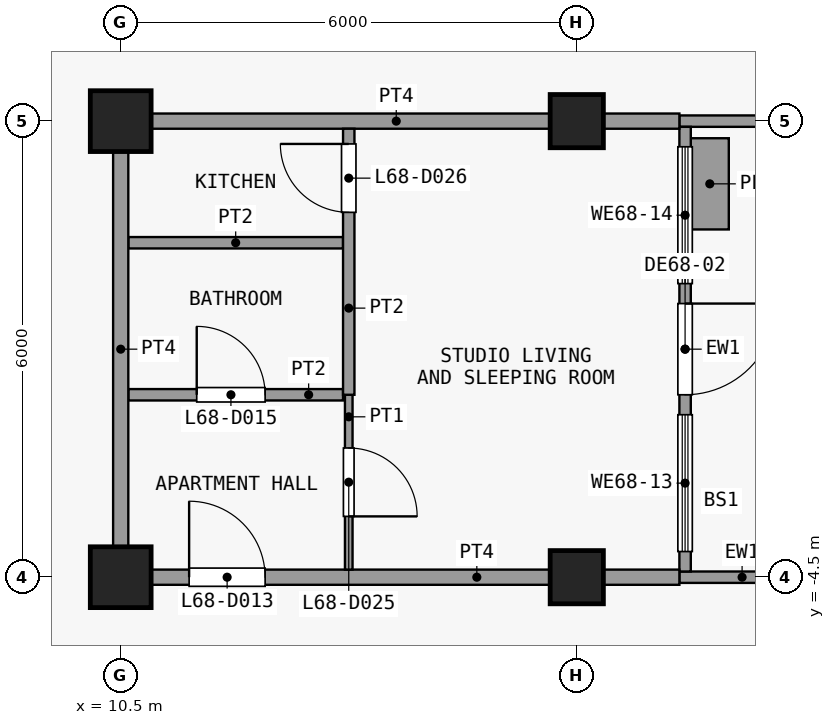
"""IFC4 building model, lengths in metres.
Left out: names, types, materials, properties, quantities, classifications, styles, units other than length and angle.
Written with IfcOpenShell. Run it as: python <this file> out.ifc"""

import sys

from ifc_helpers import new_model, si_unit, direction, frame, frame_2d, origin, origin_2d, place, context, subcontext, project, spatial, rectangle, extrude, element, fill, save


model = new_model("IFC4")
c1 = context("Model", 3, precision=1e-05, world=origin(), true_north=direction((0.0, 1.0)))
c2 = subcontext(c1, "Body", "Model", "MODEL_VIEW")
j1 = project(units=[si_unit("LENGTHUNIT", "METRE"), si_unit("PLANEANGLEUNIT", "RADIAN")], contexts=[c1])
p1 = place(None, origin())
s1 = spatial("IfcSite", under=j1, at=p1, CompositionType="ELEMENT")
p2 = place(p1, origin())
s2 = spatial("IfcBuilding", under=s1, at=p2, CompositionType="ELEMENT")
p3 = place(p2, frame((0.0, 0.0, 269.9)))
s3 = spatial("IfcBuildingStorey", under=s2, at=p3, CompositionType="ELEMENT", Elevation=269.9)
for number, where, z_axis, x_axis in (
    (1, (10.5, -4.5, 0.0), (0.0, 0.0, 1.0), (1.0, 0.0, 0.0)),
    (2, (10.5, 1.5, 0.0), (0.0, 0.0, 1.0), (1.0, 0.0, 0.0)),
):
    element("IfcColumn", number, at=place(p3, frame(where, z_axis=z_axis, x_axis=x_axis)), inside=s3, PredefinedType="COLUMN", context=c2, shape_type="SweptSolid", body=[
        extrude(rectangle(XDim=0.8, YDim=0.8, at=origin_2d()), origin(), (0.0, 0.0, 1.0), 3.6),
    ])
for number, where, z_axis, x_axis in (
    (3, (16.5, -4.5, 0.0), (0.0, 0.0, 1.0), (1.0, 0.0, 0.0)),
    (4, (16.5, 1.5, 0.0), (0.0, 0.0, 1.0), (1.0, 0.0, 0.0)),
):
    element("IfcColumn", number, at=place(p3, frame(where, z_axis=z_axis, x_axis=x_axis)), inside=s3, PredefinedType="COLUMN", context=c2, shape_type="SweptSolid", body=[
        extrude(rectangle(XDim=0.7, YDim=0.7, at=origin_2d()), origin(), (0.0, 0.0, 1.0), 3.6),
    ])
p4 = place(p3, frame((17.85, -4.5, 0.0), z_axis=(0.0, 0.0, 1.0), x_axis=(1.0, 0.0, 0.0)))
e5 = element("IfcWall", 5, at=p4, inside=s3, PredefinedType="SOLIDWALL", context=c2, shape_type="SweptSolid", body=[
    extrude(rectangle(XDim=1.65, YDim=0.15, at=frame_2d((0.825, 0.0))), origin(), (0.0, 0.0, 1.0), 3.3),
])
p5 = place(p3, frame((17.85, 1.5, 0.0), z_axis=(0.0, 0.0, 1.0), x_axis=(1.0, 0.0, 0.0)))
e6 = element("IfcWall", 6, at=p5, inside=s3, PredefinedType="SOLIDWALL", context=c2, shape_type="SweptSolid", body=[
    extrude(rectangle(XDim=2.55, YDim=0.15, at=frame_2d((1.275, 0.0))), origin(), (0.0, 0.0, 1.0), 3.3),
])
p6 = place(p3, frame((17.925, 1.425, 0.0), z_axis=(0.0, 0.0, 1.0), x_axis=(0.0, -1.0, 0.0)))
e7 = element("IfcWall", 7, at=p6, inside=s3, PredefinedType="SOLIDWALL", context=c2, shape_type="SweptSolid", body=[
    extrude(rectangle(XDim=5.85, YDim=0.15, at=frame_2d((2.925, 0.0))), origin(), (0.0, 0.0, 1.0), 3.3),
])
p7 = place(p6, frame((2.325, 0.0, 0.0)))
e8 = element("IfcOpeningElement", 8, at=p7, cuts=e7, PredefinedType="OPENING", context=c2, shape_type="SweptSolid", body=[
    extrude(rectangle(XDim=1.2, YDim=2.4, at=frame_2d((0.6, 1.2))), frame((0.0, 0.085, 0.0), z_axis=(0.0, -1.0, 0.0), x_axis=(1.0, 0.0, 0.0)), (0.0, 0.0, 1.0), 0.17),
])
p8 = place(p6, frame((3.788, 0.0, 0.9)))
e9 = element("IfcOpeningElement", 9, at=p8, cuts=e7, PredefinedType="OPENING", context=c2, shape_type="SweptSolid", body=[
    extrude(rectangle(XDim=1.8, YDim=2.1, at=frame_2d((0.9, 1.05))), frame((0.0, 0.085, 0.0), z_axis=(0.0, -1.0, 0.0), x_axis=(1.0, 0.0, 0.0)), (0.0, 0.0, 1.0), 0.17),
])
p9 = place(p6, frame((0.262, 0.0, 0.9)))
e10 = element("IfcOpeningElement", 10, at=p9, cuts=e7, PredefinedType="OPENING", context=c2, shape_type="SweptSolid", body=[
    extrude(rectangle(XDim=1.8, YDim=2.1, at=frame_2d((0.9, 1.05))), frame((0.0, 0.085, 0.0), z_axis=(0.0, -1.0, 0.0), x_axis=(1.0, 0.0, 0.0)), (0.0, 0.0, 1.0), 0.17),
])
p10 = place(p3, frame((18.25, 0.075, 0.0), z_axis=(0.0, 0.0, 1.0), x_axis=(0.0, 1.0, 0.0)))
e11 = element("IfcWall", 11, at=p10, inside=s3, PredefinedType="USERDEFINED", context=c2, shape_type="SweptSolid", body=[
    extrude(rectangle(XDim=1.2, YDim=0.5, at=frame_2d((0.6, 0.0))), origin(), (0.0, 0.0, 1.0), 0.9),
])
p11 = place(p3, frame((10.4, -4.5, 0.0), z_axis=(0.0, 0.0, 1.0), x_axis=(1.0, 0.0, 0.0)))
e12 = element("IfcWall", 12, at=p11, inside=s3, PredefinedType="PARTITIONING", context=c2, shape_type="SweptSolid", body=[
    extrude(rectangle(XDim=7.45, YDim=0.2, at=frame_2d((3.725, 0.0))), origin(), (0.0, 0.0, 1.0), 3.3),
])
p12 = place(p11, frame((1.0, 0.0, 0.0)))
e13 = element("IfcOpeningElement", 13, at=p12, cuts=e12, PredefinedType="OPENING", context=c2, shape_type="SweptSolid", body=[
    extrude(rectangle(XDim=1.0, YDim=2.1, at=frame_2d((0.5, 1.05))), frame((0.0, 0.11, 0.0), z_axis=(0.0, -1.0, 0.0), x_axis=(1.0, 0.0, 0.0)), (0.0, 0.0, 1.0), 0.22),
])
p13 = place(p3, frame((10.6, -2.1, 0.0), z_axis=(0.0, 0.0, 1.0), x_axis=(1.0, 0.0, 0.0)))
e14 = element("IfcWall", 14, at=p13, inside=s3, PredefinedType="PARTITIONING", context=c2, shape_type="SweptSolid", body=[
    extrude(rectangle(XDim=2.825, YDim=0.15, at=frame_2d((1.413, 0.0))), origin(), (0.0, 0.0, 1.0), 3.3),
])
p14 = place(p13, frame((0.9, 0.0, 0.0)))
e15 = element("IfcOpeningElement", 15, at=p14, cuts=e14, PredefinedType="OPENING", context=c2, shape_type="SweptSolid", body=[
    extrude(rectangle(XDim=0.9, YDim=2.1, at=frame_2d((0.45, 1.05))), frame((0.0, 0.085, 0.0), z_axis=(0.0, -1.0, 0.0), x_axis=(1.0, 0.0, 0.0)), (0.0, 0.0, 1.0), 0.17),
])
p15 = place(p3, frame((10.6, -0.1, 0.0), z_axis=(0.0, 0.0, 1.0), x_axis=(1.0, 0.0, 0.0)))
e16 = element("IfcWall", 16, at=p15, inside=s3, PredefinedType="PARTITIONING", context=c2, shape_type="SweptSolid", body=[
    extrude(rectangle(XDim=2.825, YDim=0.15, at=frame_2d((1.413, 0.0))), origin(), (0.0, 0.0, 1.0), 3.3),
])
p16 = place(p3, frame((10.4, 1.5, 0.0), z_axis=(0.0, 0.0, 1.0), x_axis=(1.0, 0.0, 0.0)))
e17 = element("IfcWall", 17, at=p16, inside=s3, PredefinedType="PARTITIONING", context=c2, shape_type="SweptSolid", body=[
    extrude(rectangle(XDim=7.45, YDim=0.2, at=frame_2d((3.725, 0.0))), origin(), (0.0, 0.0, 1.0), 3.3),
])
p17 = place(p3, frame((10.5, -4.4, 0.0), z_axis=(0.0, 0.0, 1.0), x_axis=(0.0, 1.0, 0.0)))
e18 = element("IfcWall", 18, at=p17, inside=s3, PredefinedType="PARTITIONING", context=c2, shape_type="SweptSolid", body=[
    extrude(rectangle(XDim=5.8, YDim=0.2, at=frame_2d((2.9, 0.0))), origin(), (0.0, 0.0, 1.0), 3.3),
])
p18 = place(p3, frame((13.5, -4.4, 0.0), z_axis=(0.0, 0.0, 1.0), x_axis=(0.0, 1.0, 0.0)))
e19 = element("IfcWall", 19, at=p18, inside=s3, PredefinedType="PARTITIONING", context=c2, shape_type="SweptSolid", body=[
    extrude(rectangle(XDim=2.3, YDim=0.1, at=frame_2d((1.15, 0.0))), origin(), (0.0, 0.0, 1.0), 3.3),
])
p19 = place(p18, frame((0.7, 0.0, 0.0)))
e20 = element("IfcOpeningElement", 20, at=p19, cuts=e19, PredefinedType="OPENING", context=c2, shape_type="SweptSolid", body=[
    extrude(rectangle(XDim=0.9, YDim=2.1, at=frame_2d((0.45, 1.05))), frame((0.0, 0.06, 0.0), z_axis=(0.0, -1.0, 0.0), x_axis=(1.0, 0.0, 0.0)), (0.0, 0.0, 1.0), 0.12),
])
p20 = place(p3, frame((13.5, -2.1, 0.0), z_axis=(0.0, 0.0, 1.0), x_axis=(0.0, 1.0, 0.0)))
e21 = element("IfcWall", 21, at=p20, inside=s3, PredefinedType="PARTITIONING", context=c2, shape_type="SweptSolid", body=[
    extrude(rectangle(XDim=3.5, YDim=0.15, at=frame_2d((1.75, 0.0))), origin(), (0.0, 0.0, 1.0), 3.3),
])
p21 = place(p20, frame((2.4, 0.0, 0.0)))
e22 = element("IfcOpeningElement", 22, at=p21, cuts=e21, PredefinedType="OPENING", context=c2, shape_type="SweptSolid", body=[
    extrude(rectangle(XDim=0.9, YDim=2.1, at=frame_2d((0.45, 1.05))), frame((0.0, 0.085, 0.0), z_axis=(0.0, -1.0, 0.0), x_axis=(1.0, 0.0, 0.0)), (0.0, 0.0, 1.0), 0.17),
])
p22 = place(p7, origin())
e23 = element("IfcDoor", 23, at=p22, inside=s3, OperationType="SINGLE_SWING_LEFT", PredefinedType="DOOR", context=c2, shape_type="SweptSolid", body=[
    extrude(rectangle(XDim=1.2, YDim=2.4, at=frame_2d((0.6, 1.2))), frame((0.0, 0.025, 0.0), z_axis=(0.0, -1.0, 0.0), x_axis=(1.0, 0.0, 0.0)), (0.0, 0.0, 1.0), 0.05),
])
fill(e8, e23)
p23 = place(p8, origin())
e24 = element("IfcWindow", 24, at=p23, inside=s3, PartitioningType="SINGLE_PANEL", PredefinedType="WINDOW", context=c2, shape_type="SweptSolid", body=[
    extrude(rectangle(XDim=1.8, YDim=2.1, at=frame_2d((0.9, 1.05))), frame((0.0, 0.03, 0.0), z_axis=(0.0, -1.0, 0.0), x_axis=(1.0, 0.0, 0.0)), (0.0, 0.0, 1.0), 0.06),
])
fill(e9, e24)
p24 = place(p9, origin())
e25 = element("IfcWindow", 25, at=p24, inside=s3, PartitioningType="SINGLE_PANEL", PredefinedType="WINDOW", context=c2, shape_type="SweptSolid", body=[
    extrude(rectangle(XDim=1.8, YDim=2.1, at=frame_2d((0.9, 1.05))), frame((0.0, 0.03, 0.0), z_axis=(0.0, -1.0, 0.0), x_axis=(1.0, 0.0, 0.0)), (0.0, 0.0, 1.0), 0.06),
])
fill(e10, e25)
p25 = place(p12, origin())
e26 = element("IfcDoor", 26, at=p25, inside=s3, OperationType="SINGLE_SWING_RIGHT", PredefinedType="DOOR", context=c2, shape_type="SweptSolid", body=[
    extrude(rectangle(XDim=1.0, YDim=2.1, at=frame_2d((0.5, 1.05))), frame((0.0, 0.025, 0.0), z_axis=(0.0, -1.0, 0.0), x_axis=(1.0, 0.0, 0.0)), (0.0, 0.0, 1.0), 0.05),
])
fill(e13, e26)
p26 = place(p14, origin())
e27 = element("IfcDoor", 27, at=p26, inside=s3, OperationType="SINGLE_SWING_RIGHT", PredefinedType="DOOR", context=c2, shape_type="SweptSolid", body=[
    extrude(rectangle(XDim=0.9, YDim=2.1, at=frame_2d((0.45, 1.05))), frame((0.0, 0.025, 0.0), z_axis=(0.0, -1.0, 0.0), x_axis=(1.0, 0.0, 0.0)), (0.0, 0.0, 1.0), 0.05),
])
fill(e15, e27)
p27 = place(p19, origin())
e28 = element("IfcDoor", 28, at=p27, inside=s3, OperationType="SINGLE_SWING_LEFT", PredefinedType="DOOR", context=c2, shape_type="SweptSolid", body=[
    extrude(rectangle(XDim=0.9, YDim=2.1, at=frame_2d((0.45, 1.05))), frame((0.0, 0.025, 0.0), z_axis=(0.0, -1.0, 0.0), x_axis=(1.0, 0.0, 0.0)), (0.0, 0.0, 1.0), 0.05),
])
fill(e20, e28)
p28 = place(p21, origin())
e29 = element("IfcDoor", 29, at=p28, inside=s3, OperationType="SINGLE_SWING_LEFT", PredefinedType="DOOR", context=c2, shape_type="SweptSolid", body=[
    extrude(rectangle(XDim=0.9, YDim=2.1, at=frame_2d((0.45, 1.05))), frame((0.0, 0.025, 0.0), z_axis=(0.0, -1.0, 0.0), x_axis=(1.0, 0.0, 0.0)), (0.0, 0.0, 1.0), 0.05),
])
fill(e22, e29)
save(model, sys.argv[1])
